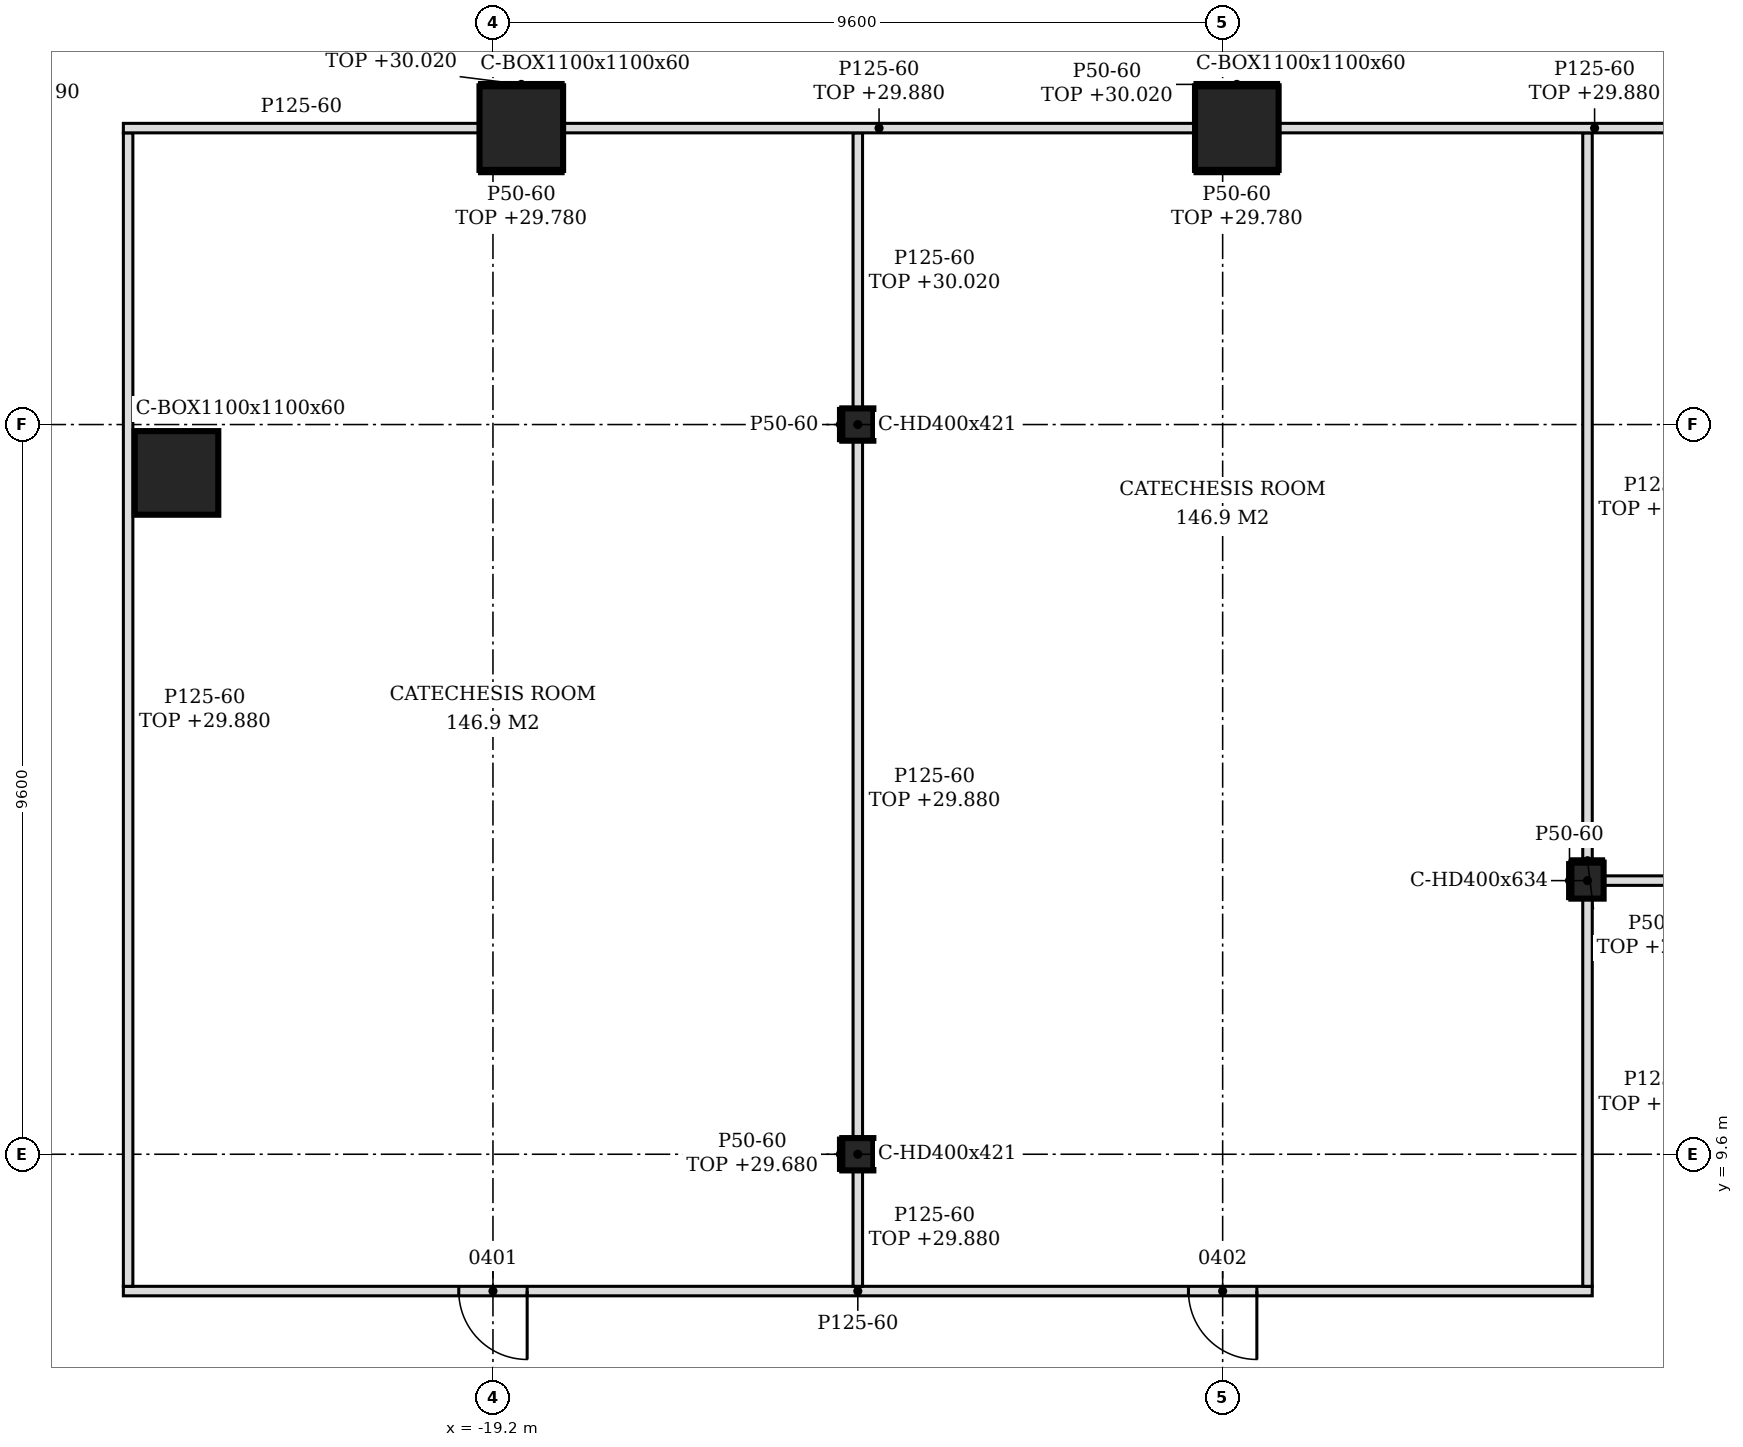
"""IFC4 building model, lengths in metres.
Left out: names, types, materials, properties, quantities, classifications, styles, units other than length and angle.
Written with IfcOpenShell. Run it as: python <this file> out.ifc"""

import sys

from ifc_helpers import new_model, si_unit, direction, frame, frame_2d, origin, origin_2d, place, context, subcontext, project, spatial, polyline, rectangle, hollow_rectangle, i_section, outline, extrude, element, fill, save


model = new_model("IFC4")
c1 = context("Model", 3, precision=1e-05, world=origin(), true_north=direction((0.0, 1.0)))
c2 = subcontext(c1, "Body", "Model", "MODEL_VIEW")
j1 = project(units=[si_unit("LENGTHUNIT", "METRE"), si_unit("PLANEANGLEUNIT", "RADIAN")], contexts=[c1])
p1 = place(None, origin())
s1 = spatial("IfcSite", under=j1, at=p1, CompositionType="ELEMENT")
p2 = place(p1, origin())
s2 = spatial("IfcBuilding", under=s1, at=p2, CompositionType="ELEMENT")
p3 = place(p2, frame((0.0, 0.0, 25.8)))
s3 = spatial("IfcBuildingStorey", under=s2, at=p3, CompositionType="ELEMENT", Elevation=25.8)
for number, where, z_axis, x_axis in (
    (1, (-9.414, 23.1, -0.2), (0.0, 0.0, 1.0), (1.0, 0.0, 0.0)),
    (2, (-18.827, 23.1, -0.2), (0.0, 0.0, 1.0), (1.0, 0.0, 0.0)),
    (3, (-23.364, 18.564, -0.2), (0.0, 0.0, 1.0), (1.0, 0.0, 0.0)),
):
    element("IfcColumn", number, at=place(p3, frame(where, z_axis=z_axis, x_axis=x_axis)), inside=s3, PredefinedType="COLUMN", context=c2, shape_type="SweptSolid", body=[
        extrude(hollow_rectangle(XDim=1.1, YDim=1.1, WallThickness=0.06, at=origin_2d()), origin(), (0.0, 0.0, 1.0), 4.8),
    ])
p4 = place(p3, frame((-4.8, 13.2, -0.2), z_axis=(0.0, 0.0, 1.0), x_axis=(1.0, 0.0, 0.0)))
e4 = element("IfcColumn", 4, at=p4, inside=s3, PredefinedType="COLUMN", context=c2, shape_type="SweptSolid", body=[
    extrude(i_section(OverallWidth=0.424, OverallDepth=0.474, WebThickness=0.048, FlangeThickness=0.077, FilletRadius=0.015, at=origin_2d()), origin(), (0.0, 0.0, 1.0), 4.8),
])
for number, where, z_axis, x_axis in (
    (5, (-14.4, 9.6, -0.2), (0.0, 0.0, 1.0), (1.0, 0.0, 0.0)),
    (6, (-14.4, 19.2, -0.2), (0.0, 0.0, 1.0), (1.0, 0.0, 0.0)),
):
    element("IfcColumn", number, at=place(p3, frame(where, z_axis=z_axis, x_axis=x_axis)), inside=s3, PredefinedType="COLUMN", context=c2, shape_type="SweptSolid", body=[
        extrude(i_section(OverallWidth=0.409, OverallDepth=0.425, WebThickness=0.033, FlangeThickness=0.052, FilletRadius=0.015, at=origin_2d()), origin(), (0.0, 0.0, 1.0), 4.8),
    ])
p5 = place(p3, frame((-24.062, 7.8, 0.0), z_axis=(0.0, 0.0, 1.0), x_axis=(1.0, 0.0, 0.0)))
e7 = element("IfcWall", 7, at=p5, inside=s3, PredefinedType="PARTITIONING", context=c2, shape_type="SweptSolid", body=[
    extrude(outline(polyline([(0.0, 0.0), (19.325, 0.0), (19.325, 3.98), (19.113, 3.98), (19.111, 4.6), (14.562, 4.6), (14.561, 4.08), (14.363, 4.08), (14.361, 4.6), (9.762, 4.6), (9.76, 4.08), (9.562, 4.08), (9.561, 4.6), (4.962, 4.6), (4.96, 4.08), (4.762, 4.08), (4.76, 4.6), (0.163, 4.6), (0.16, 4.08), (0.0, 4.08), (0.0, 0.0)])), frame((0.0, 0.062, 0.0), z_axis=(0.0, -1.0, 0.0), x_axis=(1.0, 0.0, 0.0)), (0.0, 0.0, 1.0), 0.125),
])
p6 = place(p5, frame((4.413, 0.0, 0.0)))
e8 = element("IfcOpeningElement", 8, at=p6, cuts=e7, PredefinedType="OPENING", context=c2, shape_type="SweptSolid", body=[
    extrude(rectangle(XDim=0.9, YDim=2.1, at=frame_2d((0.45, 1.05))), frame((0.0, 0.073, 0.0), z_axis=(0.0, -1.0, 0.0), x_axis=(1.0, 0.0, 0.0)), (0.0, 0.0, 1.0), 0.145),
])
p7 = place(p5, frame((14.012, 0.0, 0.0)))
e9 = element("IfcOpeningElement", 9, at=p7, cuts=e7, PredefinedType="OPENING", context=c2, shape_type="SweptSolid", body=[
    extrude(rectangle(XDim=0.9, YDim=2.1, at=frame_2d((0.45, 1.05))), frame((0.0, 0.073, 0.0), z_axis=(0.0, -1.0, 0.0), x_axis=(1.0, 0.0, 0.0)), (0.0, 0.0, 1.0), 0.145),
])
p8 = place(p3, frame((-24.0, 7.863, 0.0), z_axis=(0.0, 0.0, 1.0), x_axis=(0.0, 1.0, 0.0)))
e10 = element("IfcWall", 10, at=p8, inside=s3, PredefinedType="PARTITIONING", context=c2, shape_type="SweptSolid", body=[
    extrude(outline(polyline([(0.0, 0.0), (15.175, 0.0), (15.175, 4.08), (11.488, 4.08), (11.486, 3.98), (11.188, 3.98), (11.186, 4.08), (1.887, 4.08), (1.885, 3.88), (1.587, 3.88), (1.585, 4.08), (0.0, 4.08), (0.0, 0.0)])), frame((0.0, 0.062, 0.0), z_axis=(0.0, -1.0, 0.0), x_axis=(1.0, 0.0, 0.0)), (0.0, 0.0, 1.0), 0.125),
])
p9 = place(p3, frame((-14.4, 7.863, 0.0), z_axis=(0.0, 0.0, 1.0), x_axis=(0.0, 1.0, 0.0)))
e11 = element("IfcWall", 11, at=p9, inside=s3, PredefinedType="PARTITIONING", context=c2, shape_type="SweptSolid", body=[
    extrude(rectangle(XDim=1.525, YDim=0.125, at=frame_2d((0.762, 0.0))), origin(), (0.0, 0.0, 1.0), 4.08),
])
p10 = place(p3, frame((-4.8, 7.863, 0.0), z_axis=(0.0, 0.0, 1.0), x_axis=(0.0, 1.0, 0.0)))
e12 = element("IfcWall", 12, at=p10, inside=s3, PredefinedType="PARTITIONING", context=c2, shape_type="SweptSolid", body=[
    extrude(rectangle(XDim=5.1, YDim=0.125, at=frame_2d((2.55, 0.0))), origin(), (0.0, 0.0, 1.0), 3.98),
])
p11 = place(p3, frame((-14.4, 9.812, 0.0), z_axis=(0.0, 0.0, 1.0), x_axis=(0.0, 1.0, 0.0)))
e13 = element("IfcWall", 13, at=p11, inside=s3, PredefinedType="PARTITIONING", context=c2, shape_type="SweptSolid", body=[
    extrude(rectangle(XDim=9.175, YDim=0.125, at=frame_2d((4.587, 0.0))), origin(), (0.0, 0.0, 1.0), 4.08),
])
p12 = place(p3, frame((-4.588, 13.2, 0.0), z_axis=(0.0, 0.0, 1.0), x_axis=(1.0, 0.0, 0.0)))
e14 = element("IfcWall", 14, at=p12, inside=s3, PredefinedType="PARTITIONING", context=c2, shape_type="SweptSolid", body=[
    extrude(rectangle(XDim=11.576, YDim=0.125, at=frame_2d((5.788, 0.0))), origin(), (0.0, 0.0, 1.0), 3.98),
])
p13 = place(p12, frame((5.338, 0.0, 0.0)))
e15 = element("IfcOpeningElement", 15, at=p13, cuts=e14, PredefinedType="OPENING", context=c2, shape_type="SweptSolid", body=[
    extrude(rectangle(XDim=0.9, YDim=2.1, at=frame_2d((0.45, 1.05))), frame((0.0, 0.073, 0.0), z_axis=(0.0, -1.0, 0.0), x_axis=(1.0, 0.0, 0.0)), (0.0, 0.0, 1.0), 0.145),
])
p14 = place(p3, frame((-4.8, 13.437, 0.0), z_axis=(0.0, 0.0, 1.0), x_axis=(0.0, 1.0, 0.0)))
e16 = element("IfcWall", 16, at=p14, inside=s3, PredefinedType="PARTITIONING", context=c2, shape_type="SweptSolid", body=[
    extrude(rectangle(XDim=9.601, YDim=0.125, at=frame_2d((4.8, 0.0))), origin(), (0.0, 0.0, 1.0), 4.08),
])
p15 = place(p3, frame((-14.4, 19.413, 0.0), z_axis=(0.0, 0.0, 1.0), x_axis=(0.0, 1.0, 0.0)))
e17 = element("IfcWall", 17, at=p15, inside=s3, PredefinedType="PARTITIONING", context=c2, shape_type="SweptSolid", body=[
    extrude(outline(polyline([(0.0, 0.0), (3.625, 0.0), (3.625, 4.08), (3.538, 4.08), (3.535, 4.22), (0.0, 4.22), (0.0, 0.0)])), frame((0.0, 0.062, 0.0), z_axis=(0.0, -1.0, 0.0), x_axis=(1.0, 0.0, 0.0)), (0.0, 0.0, 1.0), 0.125),
])
p16 = place(p3, frame((-24.062, 23.1, 0.0), z_axis=(0.0, 0.0, 1.0), x_axis=(1.0, 0.0, 0.0)))
e18 = element("IfcWall", 18, at=p16, inside=s3, PredefinedType="PARTITIONING", context=c2, shape_type="SweptSolid", body=[
    extrude(rectangle(XDim=4.685, YDim=0.125, at=frame_2d((2.343, 0.0))), origin(), (0.0, 0.0, 1.0), 4.6),
])
for number, where, z_axis, x_axis in (
    (19, (-18.277, 23.1, 0.0), (0.0, 0.0, 1.0), (1.0, 0.0, 0.0)),
    (20, (-8.864, 23.1, 0.0), (0.0, 0.0, 1.0), (1.0, 0.0, 0.0)),
):
    element("IfcWall", number, at=place(p3, frame(where, z_axis=z_axis, x_axis=x_axis)), inside=s3, PredefinedType="PARTITIONING", context=c2, shape_type="SweptSolid", body=[
        extrude(rectangle(XDim=8.313, YDim=0.125, at=frame_2d((4.157, 0.0))), origin(), (0.0, 0.0, 1.0), 4.08),
    ])
p17 = place(p3, frame((-14.629, 9.387, 0.0), z_axis=(0.0, 0.0, 1.0), x_axis=(0.0, 1.0, 0.0)))
e21 = element("IfcWall", 21, at=p17, inside=s3, PredefinedType="PARTITIONING", context=c2, shape_type="SweptSolid", body=[
    extrude(rectangle(XDim=0.425, YDim=0.05, at=frame_2d((0.212, 0.0))), origin(), (0.0, 0.0, 1.0), 3.88),
])
p18 = place(p3, frame((-14.629, 18.988, 0.0), z_axis=(0.0, 0.0, 1.0), x_axis=(0.0, 1.0, 0.0)))
e22 = element("IfcWall", 22, at=p18, inside=s3, PredefinedType="PARTITIONING", context=c2, shape_type="SweptSolid", body=[
    extrude(rectangle(XDim=0.425, YDim=0.05, at=frame_2d((0.212, 0.0))), origin(), (0.0, 0.0, 1.0), 4.6),
])
p19 = place(p3, frame((-5.037, 12.963, 0.0), z_axis=(0.0, 0.0, 1.0), x_axis=(0.0, 1.0, 0.0)))
e23 = element("IfcWall", 23, at=p19, inside=s3, PredefinedType="PARTITIONING", context=c2, shape_type="SweptSolid", body=[
    extrude(rectangle(XDim=0.474, YDim=0.05, at=frame_2d((0.237, 0.0))), origin(), (0.0, 0.0, 1.0), 4.6),
])
p20 = place(p3, frame((-5.012, 13.462, 0.0), z_axis=(0.0, 0.0, 1.0), x_axis=(1.0, 0.0, 0.0)))
e24 = element("IfcWall", 24, at=p20, inside=s3, PredefinedType="PARTITIONING", context=c2, shape_type="SweptSolid", body=[
    extrude(rectangle(XDim=0.424, YDim=0.05, at=frame_2d((0.212, 0.0))), origin(), (0.0, 0.0, 1.0), 4.08),
])
p21 = place(p3, frame((-19.377, 22.525, 0.0), z_axis=(0.0, 0.0, 1.0), x_axis=(1.0, 0.0, 0.0)))
e25 = element("IfcWall", 25, at=p21, inside=s3, PredefinedType="PARTITIONING", context=c2, shape_type="SweptSolid", body=[
    extrude(rectangle(XDim=1.1, YDim=0.05, at=frame_2d((0.55, 0.0))), origin(), (0.0, 0.0, 1.0), 3.98),
])
p22 = place(p3, frame((-19.377, 23.675, 0.0), z_axis=(0.0, 0.0, 1.0), x_axis=(1.0, 0.0, 0.0)))
e26 = element("IfcWall", 26, at=p22, inside=s3, PredefinedType="PARTITIONING", context=c2, shape_type="SweptSolid", body=[
    extrude(rectangle(XDim=1.1, YDim=0.05, at=frame_2d((0.55, 0.0))), origin(), (0.0, 0.0, 1.0), 4.22),
])
p23 = place(p3, frame((-9.964, 22.525, 0.0), z_axis=(0.0, 0.0, 1.0), x_axis=(1.0, 0.0, 0.0)))
e27 = element("IfcWall", 27, at=p23, inside=s3, PredefinedType="PARTITIONING", context=c2, shape_type="SweptSolid", body=[
    extrude(rectangle(XDim=1.1, YDim=0.05, at=frame_2d((0.55, 0.0))), origin(), (0.0, 0.0, 1.0), 3.98),
])
p24 = place(p3, frame((-9.964, 23.675, 0.0), z_axis=(0.0, 0.0, 1.0), x_axis=(1.0, 0.0, 0.0)))
e28 = element("IfcWall", 28, at=p24, inside=s3, PredefinedType="PARTITIONING", context=c2, shape_type="SweptSolid", body=[
    extrude(rectangle(XDim=1.1, YDim=0.05, at=frame_2d((0.55, 0.0))), origin(), (0.0, 0.0, 1.0), 4.22),
])
p25 = place(p6, frame((0.9, 0.0, 0.0), z_axis=(0.0, 0.0, 1.0), x_axis=(-1.0, 0.0, 0.0)))
e29 = element("IfcDoor", 29, at=p25, inside=s3, OperationType="SINGLE_SWING_LEFT", PredefinedType="DOOR", context=c2, shape_type="SweptSolid", body=[
    extrude(rectangle(XDim=0.9, YDim=2.1, at=frame_2d((0.45, 1.05))), frame((0.0, 0.025, 0.0), z_axis=(0.0, -1.0, 0.0), x_axis=(1.0, 0.0, 0.0)), (0.0, 0.0, 1.0), 0.05),
])
fill(e8, e29)
p26 = place(p7, frame((0.9, 0.0, 0.0), z_axis=(0.0, 0.0, 1.0), x_axis=(-1.0, 0.0, 0.0)))
e30 = element("IfcDoor", 30, at=p26, inside=s3, OperationType="SINGLE_SWING_LEFT", PredefinedType="DOOR", context=c2, shape_type="SweptSolid", body=[
    extrude(rectangle(XDim=0.9, YDim=2.1, at=frame_2d((0.45, 1.05))), frame((0.0, 0.025, 0.0), z_axis=(0.0, -1.0, 0.0), x_axis=(1.0, 0.0, 0.0)), (0.0, 0.0, 1.0), 0.05),
])
fill(e9, e30)
save(model, sys.argv[1])
